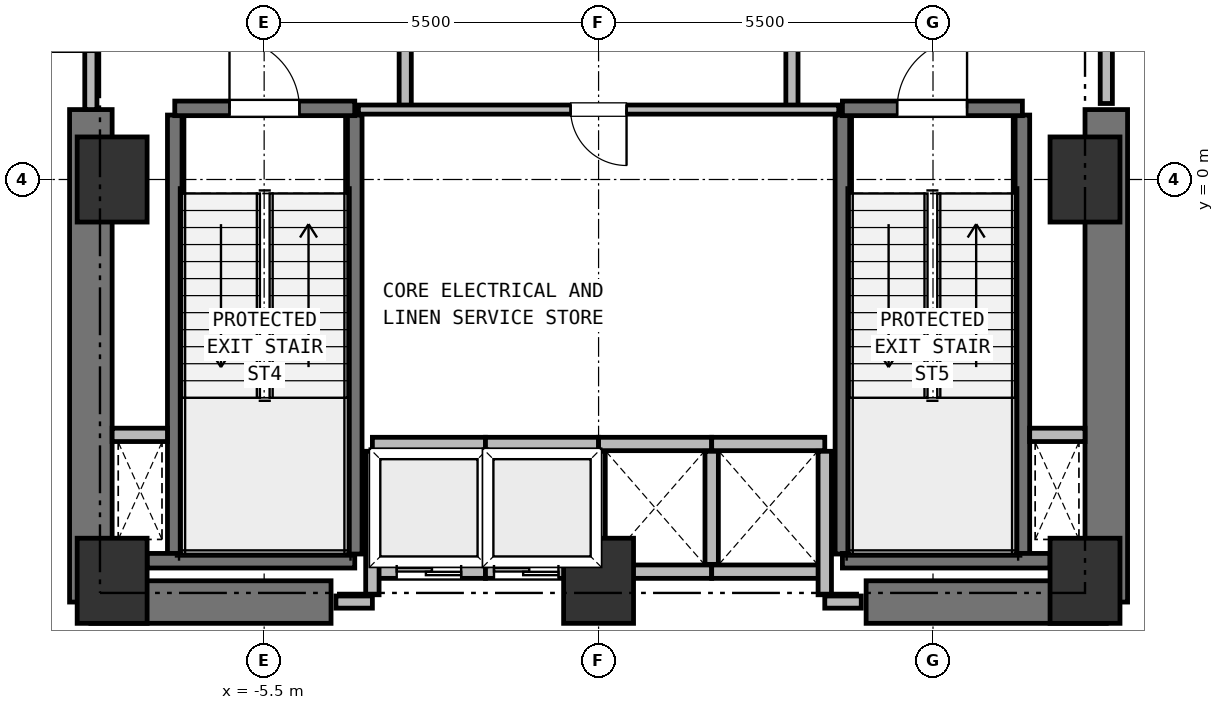
"""IFC4 building model, lengths in metres.
Left out: names, types, materials, properties, quantities, classifications, styles, units other than length and angle.
Written with IfcOpenShell. Run it as: python <this file> out.ifc"""

import sys

from ifc_helpers import new_model, si_unit, direction, frame, frame_2d, origin, origin_2d, place, context, subcontext, project, spatial, rectangle, extrude, element, fill, save


model = new_model("IFC4")
c1 = context("Model", 3, precision=1e-05, world=origin(), true_north=direction((0.0, 1.0)))
c2 = subcontext(c1, "Body", "Model", "MODEL_VIEW")
j1 = project(units=[si_unit("LENGTHUNIT", "METRE"), si_unit("PLANEANGLEUNIT", "RADIAN")], contexts=[c1])
p1 = place(None, origin())
s1 = spatial("IfcSite", under=j1, at=p1, CompositionType="ELEMENT")
p2 = place(p1, origin())
s2 = spatial("IfcBuilding", under=s1, at=p2, CompositionType="ELEMENT")
p3 = place(p2, frame((0.0, 0.0, 26.0)))
s3 = spatial("IfcBuildingStorey", under=s2, at=p3, CompositionType="ELEMENT", Elevation=26.0)
for number, where, z_axis, x_axis in (
    (1, (-8.0, -6.6, 0.0), (0.0, 0.0, 1.0), (1.0, 0.0, 0.0)),
    (2, (0.0, -6.6, 0.0), (0.0, 0.0, 1.0), (1.0, 0.0, 0.0)),
    (3, (8.0, -6.6, 0.0), (0.0, 0.0, 1.0), (1.0, 0.0, 0.0)),
    (4, (8.0, 0.0, 0.0), (0.0, 0.0, 1.0), (1.0, 0.0, 0.0)),
    (5, (-8.0, 0.0, 0.0), (0.0, 0.0, 1.0), (1.0, 0.0, 0.0)),
):
    element("IfcColumn", number, at=place(p3, frame(where, z_axis=z_axis, x_axis=x_axis)), inside=s3, PredefinedType="COLUMN", context=c2, shape_type="SweptSolid", body=[
        extrude(rectangle(XDim=1.15, YDim=1.4, at=origin_2d()), origin(), (0.0, 0.0, 1.0), 4.5),
    ])
for number, where, z_axis, x_axis in (
    (6, (-8.35, -6.95, 0.0), (0.0, 0.0, 1.0), (1.0, 0.0, 0.0)),
    (7, (4.4, -6.95, 0.0), (0.0, 0.0, 1.0), (1.0, 0.0, 0.0)),
):
    element("IfcWall", number, at=place(p3, frame(where, z_axis=z_axis, x_axis=x_axis)), inside=s3, PredefinedType="SHEAR", context=c2, shape_type="SweptSolid", body=[
        extrude(rectangle(XDim=3.95, YDim=0.7, at=frame_2d((1.975, 0.0))), origin(), (0.0, 0.0, 1.0), 4.25),
    ])
for number, where, z_axis, x_axis in (
    (8, (-8.35, -6.95, 0.0), (0.0, 0.0, 1.0), (0.0, 1.0, 0.0)),
    (9, (8.35, -6.95, 0.0), (0.0, 0.0, 1.0), (0.0, 1.0, 0.0)),
):
    element("IfcWall", number, at=place(p3, frame(where, z_axis=z_axis, x_axis=x_axis)), inside=s3, PredefinedType="SHEAR", context=c2, shape_type="SweptSolid", body=[
        extrude(rectangle(XDim=8.1, YDim=0.7, at=frame_2d((4.05, 0.0))), origin(), (0.0, 0.0, 1.0), 4.25),
    ])
p4 = place(p3, frame((-6.97, -6.16, 0.0), z_axis=(0.0, 0.0, 1.0), x_axis=(0.0, 1.0, 0.0)))
e10 = element("IfcWall", 10, at=p4, inside=s3, PredefinedType="SHEAR", context=c2, shape_type="SweptSolid", body=[
    extrude(rectangle(XDim=7.22, YDim=0.24, at=frame_2d((3.61, 0.0))), origin(), (0.0, 0.0, 1.0), 4.25),
])
p5 = place(p3, frame((-7.425, -6.27, 0.0), z_axis=(0.0, 0.0, 1.0), x_axis=(1.0, 0.0, 0.0)))
e11 = element("IfcWall", 11, at=p5, inside=s3, PredefinedType="SHEAR", context=c2, shape_type="SweptSolid", body=[
    extrude(rectangle(XDim=3.415, YDim=0.24, at=frame_2d((1.708, 0.0))), origin(), (0.0, 0.0, 1.0), 4.25),
])
p6 = place(p3, frame((-4.01, -6.16, 0.0), z_axis=(0.0, 0.0, 1.0), x_axis=(0.0, 1.0, 0.0)))
e12 = element("IfcWall", 12, at=p6, inside=s3, PredefinedType="SHEAR", context=c2, shape_type="SweptSolid", body=[
    extrude(rectangle(XDim=7.22, YDim=0.24, at=frame_2d((3.61, 0.0))), origin(), (0.0, 0.0, 1.0), 4.25),
])
p7 = place(p3, frame((-6.97, 1.17, 0.0), z_axis=(0.0, 0.0, 1.0), x_axis=(1.0, 0.0, 0.0)))
e13 = element("IfcWall", 13, at=p7, inside=s3, PredefinedType="SHEAR", context=c2, shape_type="SweptSolid", body=[
    extrude(rectangle(XDim=2.96, YDim=0.24, at=frame_2d((1.48, 0.0))), origin(), (0.0, 0.0, 1.0), 4.25),
])
p8 = place(p7, frame((0.9, 0.0, 0.0)))
e14 = element("IfcOpeningElement", 14, at=p8, cuts=e13, PredefinedType="OPENING", context=c2, shape_type="SweptSolid", body=[
    extrude(rectangle(XDim=1.15, YDim=2.15, at=frame_2d((0.575, 1.075))), frame((0.0, 0.13, 0.0), z_axis=(0.0, -1.0, 0.0), x_axis=(1.0, 0.0, 0.0)), (0.0, 0.0, 1.0), 0.26),
])
for number, where, z_axis, x_axis in (
    (15, (4.01, -6.16, 0.0), (0.0, 0.0, 1.0), (0.0, 1.0, 0.0)),
    (16, (6.97, -6.16, 0.0), (0.0, 0.0, 1.0), (0.0, 1.0, 0.0)),
):
    element("IfcWall", number, at=place(p3, frame(where, z_axis=z_axis, x_axis=x_axis)), inside=s3, PredefinedType="SHEAR", context=c2, shape_type="SweptSolid", body=[
        extrude(rectangle(XDim=7.22, YDim=0.24, at=frame_2d((3.61, 0.0))), origin(), (0.0, 0.0, 1.0), 4.25),
    ])
p9 = place(p3, frame((4.01, -6.27, 0.0), z_axis=(0.0, 0.0, 1.0), x_axis=(1.0, 0.0, 0.0)))
e17 = element("IfcWall", 17, at=p9, inside=s3, PredefinedType="SHEAR", context=c2, shape_type="SweptSolid", body=[
    extrude(rectangle(XDim=3.415, YDim=0.24, at=frame_2d((1.708, 0.0))), origin(), (0.0, 0.0, 1.0), 4.25),
])
p10 = place(p3, frame((4.01, 1.17, 0.0), z_axis=(0.0, 0.0, 1.0), x_axis=(1.0, 0.0, 0.0)))
e18 = element("IfcWall", 18, at=p10, inside=s3, PredefinedType="SHEAR", context=c2, shape_type="SweptSolid", body=[
    extrude(rectangle(XDim=2.96, YDim=0.24, at=frame_2d((1.48, 0.0))), origin(), (0.0, 0.0, 1.0), 4.25),
])
p11 = place(p10, frame((0.9, 0.0, 0.0)))
e19 = element("IfcOpeningElement", 19, at=p11, cuts=e18, PredefinedType="OPENING", context=c2, shape_type="SweptSolid", body=[
    extrude(rectangle(XDim=1.15, YDim=2.15, at=frame_2d((0.575, 1.075))), frame((0.0, 0.13, 0.0), z_axis=(0.0, -1.0, 0.0), x_axis=(1.0, 0.0, 0.0)), (0.0, 0.0, 1.0), 0.26),
])
for number, where, z_axis, x_axis in (
    (20, (-8.0, -4.2, 0.0), (0.0, 0.0, 1.0), (1.0, 0.0, 0.0)),
    (21, (7.09, -4.2, 0.0), (0.0, 0.0, 1.0), (1.0, 0.0, 0.0)),
):
    element("IfcWall", number, at=place(p3, frame(where, z_axis=z_axis, x_axis=x_axis)), inside=s3, PredefinedType="PARTITIONING", context=c2, shape_type="SweptSolid", body=[
        extrude(rectangle(XDim=0.91, YDim=0.22, at=frame_2d((0.455, 0.0))), origin(), (0.0, 0.0, 1.0), 4.25),
    ])
p12 = place(p3, frame((-3.72, -6.45, 0.0), z_axis=(0.0, 0.0, 1.0), x_axis=(1.0, 0.0, 0.0)))
e22 = element("IfcWall", 22, at=p12, inside=s3, PredefinedType="PARTITIONING", context=c2, shape_type="SweptSolid", body=[
    extrude(rectangle(XDim=1.86, YDim=0.22, at=frame_2d((0.93, 0.0))), origin(), (0.0, 0.0, 1.0), 3.83),
])
p13 = place(p12, frame((0.4, 0.0, 0.0)))
e23 = element("IfcOpeningElement", 23, at=p13, cuts=e22, PredefinedType="OPENING", context=c2, shape_type="SweptSolid", body=[
    extrude(rectangle(XDim=1.06, YDim=2.15, at=frame_2d((0.53, 1.075))), frame((0.0, 0.12, 0.0), z_axis=(0.0, -1.0, 0.0), x_axis=(1.0, 0.0, 0.0)), (0.0, 0.0, 1.0), 0.24),
])
p14 = place(p3, frame((-3.72, -4.35, 0.0), z_axis=(0.0, 0.0, 1.0), x_axis=(1.0, 0.0, 0.0)))
e24 = element("IfcWall", 24, at=p14, inside=s3, PredefinedType="PARTITIONING", context=c2, shape_type="SweptSolid", body=[
    extrude(rectangle(XDim=1.86, YDim=0.22, at=frame_2d((0.93, 0.0))), origin(), (0.0, 0.0, 1.0), 4.25),
])
p15 = place(p3, frame((-3.72, -6.83, 0.0), z_axis=(0.0, 0.0, 1.0), x_axis=(0.0, 1.0, 0.0)))
e25 = element("IfcWall", 25, at=p15, inside=s3, PredefinedType="PARTITIONING", context=c2, shape_type="SweptSolid", body=[
    extrude(rectangle(XDim=2.36, YDim=0.22, at=frame_2d((1.18, 0.0))), origin(), (0.0, 0.0, 1.0), 4.25),
])
p16 = place(p3, frame((-1.86, -6.33, 0.0), z_axis=(0.0, 0.0, 1.0), x_axis=(0.0, 1.0, 0.0)))
e26 = element("IfcWall", 26, at=p16, inside=s3, PredefinedType="PARTITIONING", context=c2, shape_type="SweptSolid", body=[
    extrude(rectangle(XDim=1.86, YDim=0.22, at=frame_2d((0.93, 0.0))), origin(), (0.0, 0.0, 1.0), 4.25),
])
p17 = place(p3, frame((-1.86, -6.45, 0.0), z_axis=(0.0, 0.0, 1.0), x_axis=(1.0, 0.0, 0.0)))
e27 = element("IfcWall", 27, at=p17, inside=s3, PredefinedType="PARTITIONING", context=c2, shape_type="SweptSolid", body=[
    extrude(rectangle(XDim=1.86, YDim=0.22, at=frame_2d((0.93, 0.0))), origin(), (0.0, 0.0, 1.0), 3.83),
])
p18 = place(p17, frame((0.14, 0.0, 0.0)))
e28 = element("IfcOpeningElement", 28, at=p18, cuts=e27, PredefinedType="OPENING", context=c2, shape_type="SweptSolid", body=[
    extrude(rectangle(XDim=1.06, YDim=2.15, at=frame_2d((0.53, 1.075))), frame((0.0, 0.12, 0.0), z_axis=(0.0, -1.0, 0.0), x_axis=(1.0, 0.0, 0.0)), (0.0, 0.0, 1.0), 0.24),
])
for number, where, z_axis, x_axis in (
    (29, (-1.86, -4.35, 0.0), (0.0, 0.0, 1.0), (1.0, 0.0, 0.0)),
    (30, (0.0, -6.33, 0.0), (0.0, 0.0, 1.0), (0.0, 1.0, 0.0)),
):
    element("IfcWall", number, at=place(p3, frame(where, z_axis=z_axis, x_axis=x_axis)), inside=s3, PredefinedType="PARTITIONING", context=c2, shape_type="SweptSolid", body=[
        extrude(rectangle(XDim=1.86, YDim=0.22, at=frame_2d((0.93, 0.0))), origin(), (0.0, 0.0, 1.0), 4.25),
    ])
p19 = place(p3, frame((0.0, -6.45, 0.0), z_axis=(0.0, 0.0, 1.0), x_axis=(1.0, 0.0, 0.0)))
e31 = element("IfcWall", 31, at=p19, inside=s3, PredefinedType="PARTITIONING", context=c2, shape_type="SweptSolid", body=[
    extrude(rectangle(XDim=1.86, YDim=0.22, at=frame_2d((0.93, 0.0))), origin(), (0.0, 0.0, 1.0), 3.83),
])
for number, where, z_axis, x_axis in (
    (32, (0.0, -4.35, 0.0), (0.0, 0.0, 1.0), (1.0, 0.0, 0.0)),
    (33, (1.86, -6.33, 0.0), (0.0, 0.0, 1.0), (0.0, 1.0, 0.0)),
):
    element("IfcWall", number, at=place(p3, frame(where, z_axis=z_axis, x_axis=x_axis)), inside=s3, PredefinedType="PARTITIONING", context=c2, shape_type="SweptSolid", body=[
        extrude(rectangle(XDim=1.86, YDim=0.22, at=frame_2d((0.93, 0.0))), origin(), (0.0, 0.0, 1.0), 4.25),
    ])
p20 = place(p3, frame((1.86, -6.45, 0.0), z_axis=(0.0, 0.0, 1.0), x_axis=(1.0, 0.0, 0.0)))
e34 = element("IfcWall", 34, at=p20, inside=s3, PredefinedType="PARTITIONING", context=c2, shape_type="SweptSolid", body=[
    extrude(rectangle(XDim=1.86, YDim=0.22, at=frame_2d((0.93, 0.0))), origin(), (0.0, 0.0, 1.0), 3.83),
])
p21 = place(p3, frame((1.86, -4.35, 0.0), z_axis=(0.0, 0.0, 1.0), x_axis=(1.0, 0.0, 0.0)))
e35 = element("IfcWall", 35, at=p21, inside=s3, PredefinedType="PARTITIONING", context=c2, shape_type="SweptSolid", body=[
    extrude(rectangle(XDim=1.86, YDim=0.22, at=frame_2d((0.93, 0.0))), origin(), (0.0, 0.0, 1.0), 4.25),
])
p22 = place(p3, frame((3.72, -6.83, 0.0), z_axis=(0.0, 0.0, 1.0), x_axis=(0.0, 1.0, 0.0)))
e36 = element("IfcWall", 36, at=p22, inside=s3, PredefinedType="PARTITIONING", context=c2, shape_type="SweptSolid", body=[
    extrude(rectangle(XDim=2.36, YDim=0.22, at=frame_2d((1.18, 0.0))), origin(), (0.0, 0.0, 1.0), 4.25),
])
p23 = place(p3, frame((-3.18, 1.15, 0.0), z_axis=(0.0, 0.0, 1.0), x_axis=(0.0, 1.0, 0.0)))
e37 = element("IfcWall", 37, at=p23, inside=s3, PredefinedType="PARTITIONING", context=c2, shape_type="SweptSolid", body=[
    extrude(rectangle(XDim=3.3, YDim=0.2, at=frame_2d((1.65, 0.0))), origin(), (0.0, 0.0, 1.0), 4.25),
])
p24 = place(p23, frame((1.08, 0.0, 0.0)))
e38 = element("IfcOpeningElement", 38, at=p24, cuts=e37, PredefinedType="OPENING", context=c2, shape_type="SweptSolid", body=[
    extrude(rectangle(XDim=1.15, YDim=2.15, at=frame_2d((0.575, 1.075))), frame((0.0, 0.11, 0.0), z_axis=(0.0, -1.0, 0.0), x_axis=(1.0, 0.0, 0.0)), (0.0, 0.0, 1.0), 0.22),
])
p25 = place(p3, frame((3.18, 1.15, 0.0), z_axis=(0.0, 0.0, 1.0), x_axis=(0.0, 1.0, 0.0)))
e39 = element("IfcWall", 39, at=p25, inside=s3, PredefinedType="PARTITIONING", context=c2, shape_type="SweptSolid", body=[
    extrude(rectangle(XDim=3.3, YDim=0.2, at=frame_2d((1.65, 0.0))), origin(), (0.0, 0.0, 1.0), 4.25),
])
p26 = place(p25, frame((1.08, 0.0, 0.0)))
e40 = element("IfcOpeningElement", 40, at=p26, cuts=e39, PredefinedType="OPENING", context=c2, shape_type="SweptSolid", body=[
    extrude(rectangle(XDim=1.15, YDim=2.15, at=frame_2d((0.575, 1.075))), frame((0.0, 0.11, 0.0), z_axis=(0.0, -1.0, 0.0), x_axis=(1.0, 0.0, 0.0)), (0.0, 0.0, 1.0), 0.22),
])
p27 = place(p3, frame((-8.35, 1.15, 0.0), z_axis=(0.0, 0.0, 1.0), x_axis=(0.0, 1.0, 0.0)))
e41 = element("IfcWall", 41, at=p27, inside=s3, PredefinedType="PARTITIONING", context=c2, shape_type="SweptSolid", body=[
    extrude(rectangle(XDim=5.4, YDim=0.2, at=frame_2d((2.7, 0.0))), origin(), (0.0, 0.0, 1.0), 4.25),
])
p28 = place(p27, frame((0.95, 0.0, 0.0)))
e42 = element("IfcOpeningElement", 42, at=p28, cuts=e41, PredefinedType="OPENING", context=c2, shape_type="SweptSolid", body=[
    extrude(rectangle(XDim=1.15, YDim=2.15, at=frame_2d((0.575, 1.075))), frame((0.0, 0.11, 0.0), z_axis=(0.0, -1.0, 0.0), x_axis=(1.0, 0.0, 0.0)), (0.0, 0.0, 1.0), 0.22),
])
p29 = place(p3, frame((8.35, 1.25, 0.0), z_axis=(0.0, 0.0, 1.0), x_axis=(0.0, 1.0, 0.0)))
e43 = element("IfcWall", 43, at=p29, inside=s3, PredefinedType="PARTITIONING", context=c2, shape_type="SweptSolid", body=[
    extrude(rectangle(XDim=5.3, YDim=0.2, at=frame_2d((2.65, 0.0))), origin(), (0.0, 0.0, 1.0), 4.25),
])
p30 = place(p29, frame((0.95, 0.0, 0.0)))
e44 = element("IfcOpeningElement", 44, at=p30, cuts=e43, PredefinedType="OPENING", context=c2, shape_type="SweptSolid", body=[
    extrude(rectangle(XDim=1.15, YDim=2.15, at=frame_2d((0.575, 1.075))), frame((0.0, 0.11, 0.0), z_axis=(0.0, -1.0, 0.0), x_axis=(1.0, 0.0, 0.0)), (0.0, 0.0, 1.0), 0.22),
])
p31 = place(p3, frame((3.95, 1.15, 0.0), z_axis=(0.0, 0.0, 1.0), x_axis=(-1.0, 0.0, 0.0)))
e45 = element("IfcWall", 45, at=p31, inside=s3, PredefinedType="PARTITIONING", context=c2, shape_type="SweptSolid", body=[
    extrude(rectangle(XDim=7.9, YDim=0.15, at=frame_2d((3.95, 0.0))), origin(), (0.0, 0.0, 1.0), 4.25),
])
p32 = place(p31, frame((3.49, 0.0, 0.0)))
e46 = element("IfcOpeningElement", 46, at=p32, cuts=e45, PredefinedType="OPENING", context=c2, shape_type="SweptSolid", body=[
    extrude(rectangle(XDim=0.92, YDim=2.05, at=frame_2d((0.46, 1.025))), frame((0.0, 0.085, 0.0), z_axis=(0.0, -1.0, 0.0), x_axis=(1.0, 0.0, 0.0)), (0.0, 0.0, 1.0), 0.17),
])
for number, where, z_axis, x_axis in (
    (47, (-4.32, -6.95, 0.0), (0.0, 0.0, 1.0), (1.0, 0.0, 0.0)),
    (48, (3.72, -6.95, 0.0), (0.0, 0.0, 1.0), (1.0, 0.0, 0.0)),
):
    element("IfcWall", number, at=place(p3, frame(where, z_axis=z_axis, x_axis=x_axis)), inside=s3, PredefinedType="PARTITIONING", context=c2, shape_type="SweptSolid", body=[
        extrude(rectangle(XDim=0.6, YDim=0.2, at=frame_2d((0.3, 0.0))), origin(), (0.0, 0.0, 1.0), 4.25),
    ])
p33 = place(p8, origin())
e49 = element("IfcDoor", 49, at=p33, inside=s3, OperationType="SINGLE_SWING_LEFT", PredefinedType="DOOR", context=c2, shape_type="SweptSolid", body=[
    extrude(rectangle(XDim=1.15, YDim=2.15, at=frame_2d((0.575, 1.075))), frame((0.0, 0.025, 0.0), z_axis=(0.0, -1.0, 0.0), x_axis=(1.0, 0.0, 0.0)), (0.0, 0.0, 1.0), 0.05),
])
fill(e14, e49)
p34 = place(p11, origin())
e50 = element("IfcDoor", 50, at=p34, inside=s3, OperationType="SINGLE_SWING_RIGHT", PredefinedType="DOOR", context=c2, shape_type="SweptSolid", body=[
    extrude(rectangle(XDim=1.15, YDim=2.15, at=frame_2d((0.575, 1.075))), frame((0.0, 0.025, 0.0), z_axis=(0.0, -1.0, 0.0), x_axis=(1.0, 0.0, 0.0)), (0.0, 0.0, 1.0), 0.05),
])
fill(e19, e50)
p35 = place(p13, origin())
e51 = element("IfcDoor", 51, at=p35, inside=s3, OperationType="DOUBLE_DOOR_SLIDING", PredefinedType="DOOR", context=c2, shape_type="SweptSolid", body=[
    extrude(rectangle(XDim=1.06, YDim=2.15, at=frame_2d((0.53, 1.075))), frame((0.0, 0.025, 0.0), z_axis=(0.0, -1.0, 0.0), x_axis=(1.0, 0.0, 0.0)), (0.0, 0.0, 1.0), 0.05),
])
fill(e23, e51)
p36 = place(p18, origin())
e52 = element("IfcDoor", 52, at=p36, inside=s3, OperationType="DOUBLE_DOOR_SLIDING", PredefinedType="DOOR", context=c2, shape_type="SweptSolid", body=[
    extrude(rectangle(XDim=1.06, YDim=2.15, at=frame_2d((0.53, 1.075))), frame((0.0, 0.025, 0.0), z_axis=(0.0, -1.0, 0.0), x_axis=(1.0, 0.0, 0.0)), (0.0, 0.0, 1.0), 0.05),
])
fill(e28, e52)
p37 = place(p28, origin())
e53 = element("IfcDoor", 53, at=p37, inside=s3, OperationType="SINGLE_SWING_LEFT", PredefinedType="DOOR", context=c2, shape_type="SweptSolid", body=[
    extrude(rectangle(XDim=1.15, YDim=2.15, at=frame_2d((0.575, 1.075))), frame((0.0, 0.025, 0.0), z_axis=(0.0, -1.0, 0.0), x_axis=(1.0, 0.0, 0.0)), (0.0, 0.0, 1.0), 0.05),
])
fill(e42, e53)
p38 = place(p32, origin())
e54 = element("IfcDoor", 54, at=p38, inside=s3, OperationType="SINGLE_SWING_LEFT", PredefinedType="DOOR", context=c2, shape_type="SweptSolid", body=[
    extrude(rectangle(XDim=0.92, YDim=2.05, at=frame_2d((0.46, 1.025))), frame((0.0, 0.025, 0.0), z_axis=(0.0, -1.0, 0.0), x_axis=(1.0, 0.0, 0.0)), (0.0, 0.0, 1.0), 0.05),
])
fill(e46, e54)
save(model, sys.argv[1])
